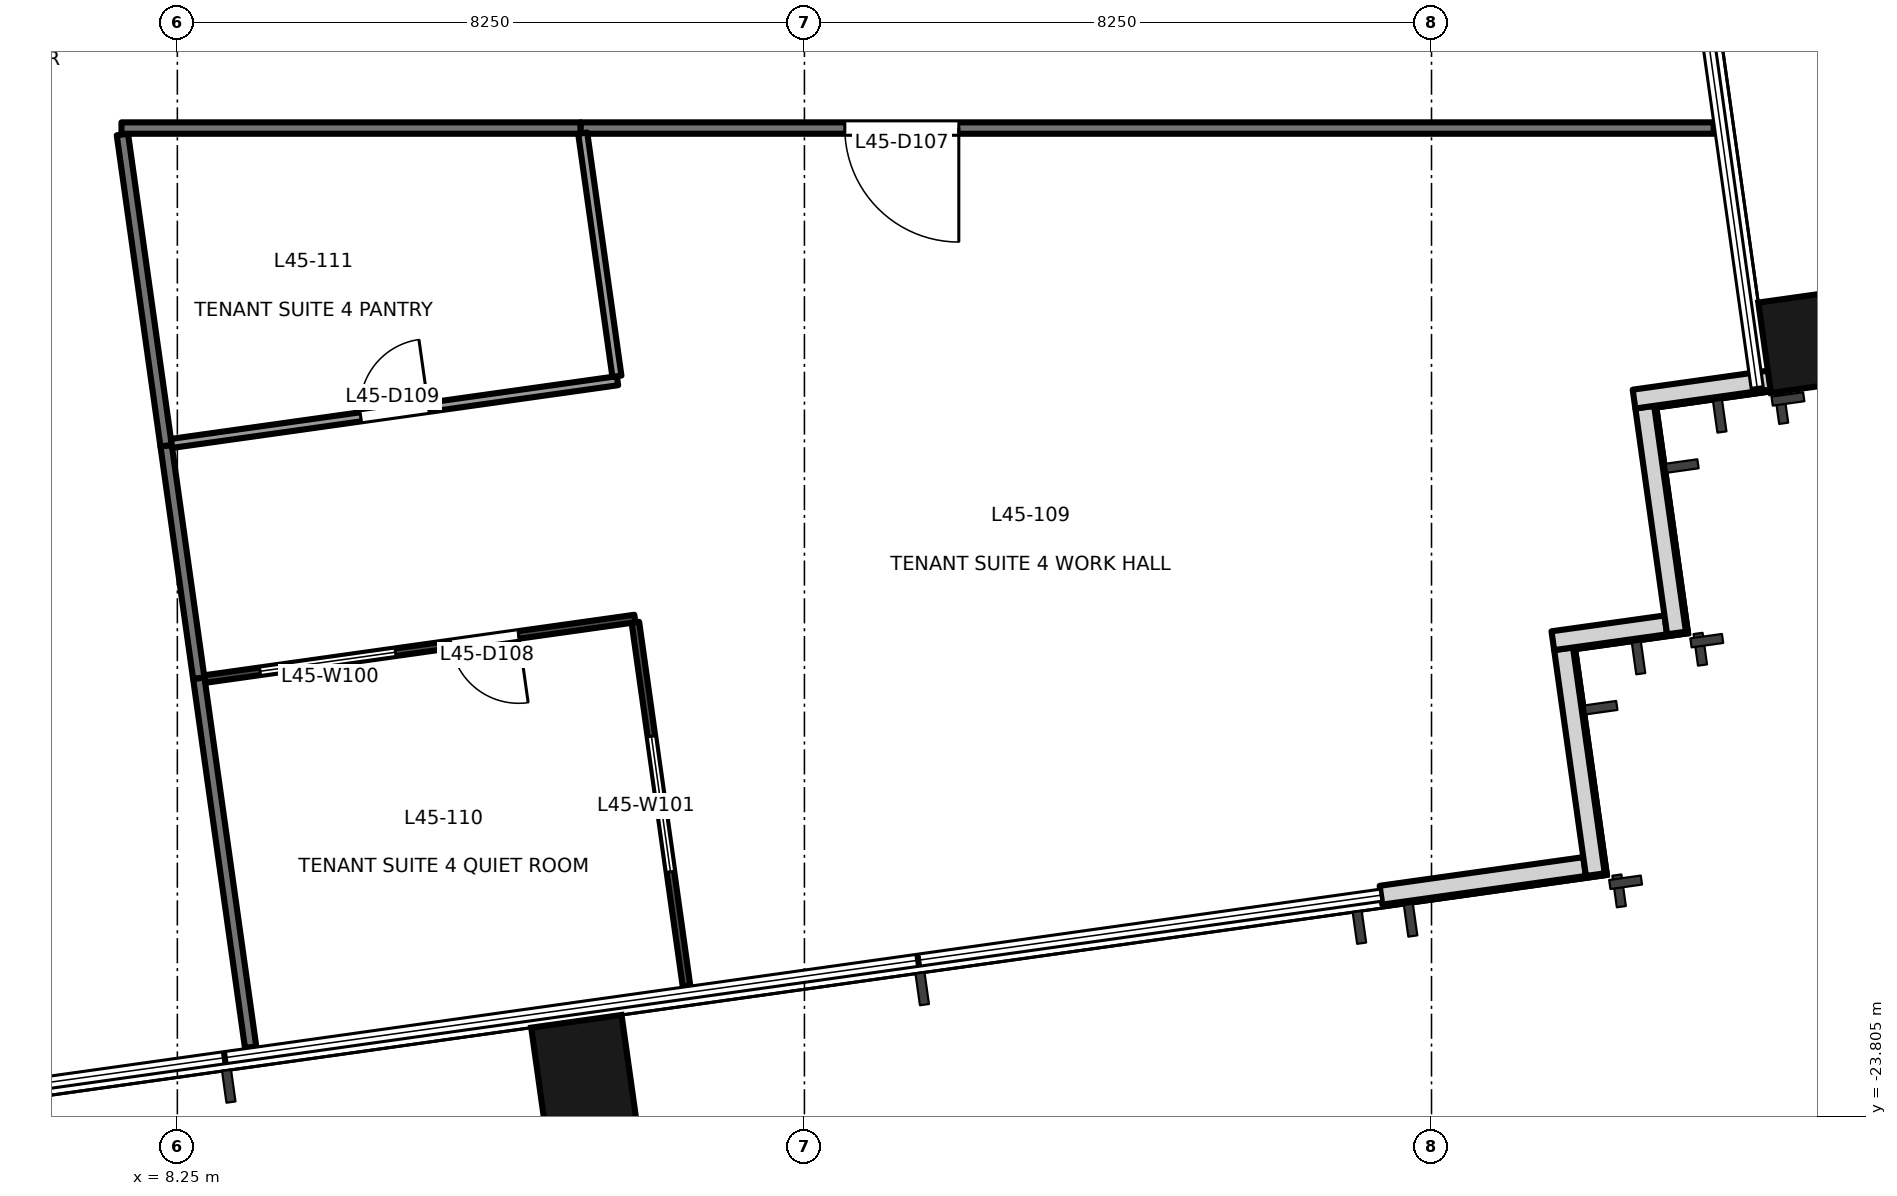
"""IFC4 building model, lengths in metres.
Left out: names, types, materials, properties, quantities, classifications, styles, units other than length and angle.
Written with IfcOpenShell. Run it as: python <this file> out.ifc"""

import sys

from ifc_helpers import new_model, si_unit, direction, frame, frame_2d, origin, origin_2d, place, context, subcontext, project, spatial, rectangle, extrude, element, fill, save


model = new_model("IFC4")
c1 = context("Model", 3, precision=1e-05, world=origin(), true_north=direction((0.0, 1.0)))
c2 = subcontext(c1, "Body", "Model", "MODEL_VIEW")
j1 = project(units=[si_unit("LENGTHUNIT", "METRE"), si_unit("PLANEANGLEUNIT", "RADIAN")], contexts=[c1])
p1 = place(None, origin())
s1 = spatial("IfcSite", under=j1, at=p1, CompositionType="ELEMENT")
p2 = place(p1, origin())
s2 = spatial("IfcBuilding", under=s1, at=p2, CompositionType="ELEMENT")
p3 = place(p2, frame((0.0, 0.0, 195.8)))
s3 = spatial("IfcBuildingStorey", under=s2, at=p3, CompositionType="ELEMENT", Elevation=195.8)
for number, where, z_axis, x_axis in (
    (1, (13.625, -23.443, -0.2), (0.0, 0.0, 1.0), (0.99, 0.139, 0.0)),
    (2, (30.024, -13.565, -0.2), (0.0, 0.0, 1.0), (-0.139, 0.99, 0.0)),
):
    element("IfcColumn", number, at=place(p3, frame(where, z_axis=z_axis, x_axis=x_axis)), inside=s3, PredefinedType="COLUMN", context=c2, shape_type="SweptSolid", body=[
        extrude(rectangle(XDim=1.2, YDim=1.8, at=origin_2d()), origin(), (0.0, 0.0, 1.0), 3.9),
    ])
p4 = place(p3, frame((24.085, -20.893, 0.0), z_axis=(0.0, 0.0, 1.0), x_axis=(0.990255800966, 0.139260362823, 0.0)))
e3 = element("IfcWall", 3, at=p4, inside=s3, PredefinedType="SOLIDWALL", context=c2, shape_type="SweptSolid", body=[
    extrude(rectangle(XDim=2.705, YDim=0.25, at=frame_2d((1.353, 0.0))), origin(), (0.0, 0.0, 1.0), 3.7),
])
p5 = place(p3, frame((26.905, -20.622, 0.0), z_axis=(0.0, 0.0, 1.0), x_axis=(-0.139313431826, 0.990248336385, 0.0)))
e4 = element("IfcWall", 4, at=p5, inside=s3, PredefinedType="SOLIDWALL", context=c2, shape_type="SweptSolid", body=[
    extrude(rectangle(XDim=3.0, YDim=0.25, at=frame_2d((1.5, 0.0))), origin(), (0.0, 0.0, 1.0), 3.7),
])
p6 = place(p3, frame((26.346, -17.544, 0.0), z_axis=(0.0, 0.0, 1.0), x_axis=(0.990368090482, 0.13845954411, 0.0)))
e5 = element("IfcWall", 5, at=p6, inside=s3, PredefinedType="SOLIDWALL", context=c2, shape_type="SweptSolid", body=[
    extrude(rectangle(XDim=1.5, YDim=0.25, at=frame_2d((0.75, 0.0))), origin(), (0.0, 0.0, 1.0), 3.7),
])
p7 = place(p3, frame((27.973, -17.443, 0.0), z_axis=(0.0, 0.0, 1.0), x_axis=(-0.139313431826, 0.990248336385, 0.0)))
e6 = element("IfcWall", 6, at=p7, inside=s3, PredefinedType="SOLIDWALL", context=c2, shape_type="SweptSolid", body=[
    extrude(rectangle(XDim=3.0, YDim=0.25, at=frame_2d((1.5, 0.0))), origin(), (0.0, 0.0, 1.0), 3.7),
])
p8 = place(p3, frame((27.414, -14.366, 0.0), z_axis=(0.0, 0.0, 1.0), x_axis=(0.990256286673, 0.139256908998, 0.0)))
e7 = element("IfcWall", 7, at=p8, inside=s3, PredefinedType="SOLIDWALL", context=c2, shape_type="SweptSolid", body=[
    extrude(rectangle(XDim=1.801, YDim=0.25, at=frame_2d((0.9, 0.0))), origin(), (0.0, 0.0, 1.0), 3.7),
])
p9 = place(p3, frame((8.102, -14.979, 0.0), z_axis=(0.0, 0.0, 1.0), x_axis=(0.139131354665, -0.990273934903, 0.0)))
e8 = element("IfcWall", 8, at=p9, inside=s3, PredefinedType="PARTITIONING", context=c2, shape_type="SweptSolid", body=[
    extrude(rectangle(XDim=3.09, YDim=0.15, at=frame_2d((1.545, 0.0))), origin(), (0.0, 0.0, 1.0), 3.7),
])
p10 = place(p3, frame((28.463, -10.8, 0.0), z_axis=(0.0, 0.0, 1.0), x_axis=(-1.0, 0.0, 0.0)))
e9 = element("IfcWall", 9, at=p10, inside=s3, PredefinedType="PARTITIONING", context=c2, shape_type="SweptSolid", body=[
    extrude(rectangle(XDim=14.909, YDim=0.15, at=frame_2d((7.455, 0.0))), origin(), (0.0, 0.0, 1.0), 3.1),
])
p11 = place(p10, frame((9.932, 0.0, 0.0)))
e10 = element("IfcOpeningElement", 10, at=p11, cuts=e9, PredefinedType="OPENING", context=c2, shape_type="SweptSolid", body=[
    extrude(rectangle(XDim=1.5, YDim=2.1, at=frame_2d((0.75, 1.05))), frame((0.0, 0.085, 0.0), z_axis=(0.0, -1.0, 0.0), x_axis=(1.0, 0.0, 0.0)), (0.0, 0.0, 1.0), 0.171),
])
p12 = place(p3, frame((8.532, -18.039, 0.0), z_axis=(0.0, 0.0, 1.0), x_axis=(0.139189187394, -0.990265807808, 0.0)))
e11 = element("IfcWall", 11, at=p12, inside=s3, PredefinedType="PARTITIONING", context=c2, shape_type="SweptSolid", body=[
    extrude(rectangle(XDim=4.901, YDim=0.15, at=frame_2d((2.45, 0.0))), origin(), (0.0, 0.0, 1.0), 3.0),
])
p13 = place(p3, frame((7.527, -10.885, 0.0), z_axis=(0.0, 0.0, 1.0), x_axis=(0.1390729581, -0.990282137739, 0.0)))
e12 = element("IfcWall", 12, at=p13, inside=s3, PredefinedType="PARTITIONING", context=c2, shape_type="SweptSolid", body=[
    extrude(rectangle(XDim=4.134, YDim=0.15, at=frame_2d((2.067, 0.0))), origin(), (0.0, 0.0, 1.0), 3.7),
])
p14 = place(p3, frame((13.554, -10.8, 0.0), z_axis=(0.0, 0.0, 1.0), x_axis=(-1.0, 0.0, 0.0)))
e13 = element("IfcWall", 13, at=p14, inside=s3, PredefinedType="PARTITIONING", context=c2, shape_type="SweptSolid", body=[
    extrude(rectangle(XDim=6.039, YDim=0.15, at=frame_2d((3.02, 0.0))), origin(), (0.0, 0.0, 1.0), 3.0),
])
p15 = place(p3, frame((14.269, -17.253, 0.0), z_axis=(0.0, 0.0, 1.0), x_axis=(-0.990248016247, -0.139315707364, 0.0)))
e14 = element("IfcWall", 14, at=p15, inside=s3, PredefinedType="PARTITIONING", context=c2, shape_type="SweptSolid", body=[
    extrude(rectangle(XDim=5.715, YDim=0.1, at=frame_2d((2.857, 0.0))), origin(), (0.0, 0.0, 1.0), 3.0),
])
p16 = place(p15, frame((1.544, 0.0, 0.0)))
e15 = element("IfcOpeningElement", 15, at=p16, cuts=e14, PredefinedType="OPENING", context=c2, shape_type="SweptSolid", body=[
    extrude(rectangle(XDim=0.9, YDim=2.1, at=frame_2d((0.45, 1.05))), frame((0.0, 0.061, 0.0), z_axis=(0.0, -1.0, 0.0), x_axis=(1.0, 0.0, 0.0)), (0.0, 0.0, 1.0), 0.121),
])
p17 = place(p15, frame((3.18, 0.0, 0.9)))
e16 = element("IfcOpeningElement", 16, at=p17, cuts=e14, PredefinedType="OPENING", context=c2, shape_type="SweptSolid", body=[
    extrude(rectangle(XDim=1.8, YDim=1.2, at=frame_2d((0.9, 0.6))), frame((0.0, 0.061, 0.0), z_axis=(0.0, -1.0, 0.0), x_axis=(1.0, 0.0, 0.0)), (0.0, 0.0, 1.0), 0.121),
])
p18 = place(p3, frame((14.948, -22.085, 0.0), z_axis=(0.0, 0.0, 1.0), x_axis=(-0.139184338849, 0.990266489294, 0.0)))
e17 = element("IfcWall", 17, at=p18, inside=s3, PredefinedType="PARTITIONING", context=c2, shape_type="SweptSolid", body=[
    extrude(rectangle(XDim=4.829, YDim=0.1, at=frame_2d((2.415, 0.0))), origin(), (0.0, 0.0, 1.0), 3.7),
])
p19 = place(p18, frame((1.515, 0.0, 0.9)))
e18 = element("IfcOpeningElement", 18, at=p19, cuts=e17, PredefinedType="OPENING", context=c2, shape_type="SweptSolid", body=[
    extrude(rectangle(XDim=1.8, YDim=1.2, at=frame_2d((0.9, 0.6))), frame((0.0, 0.061, 0.0), z_axis=(0.0, -1.0, 0.0), x_axis=(1.0, 0.0, 0.0)), (0.0, 0.0, 1.0), 0.121),
])
p20 = place(p3, frame((8.174, -14.949, 0.0), z_axis=(0.0, 0.0, 1.0), x_axis=(0.990258620858, 0.139240309595, 0.0)))
e19 = element("IfcWall", 19, at=p20, inside=s3, PredefinedType="PARTITIONING", context=c2, shape_type="SweptSolid", body=[
    extrude(rectangle(XDim=5.925, YDim=0.12, at=frame_2d((2.962, 0.0))), origin(), (0.0, 0.0, 1.0), 3.0),
])
p21 = place(p20, frame((2.513, 0.0, 0.0)))
e20 = element("IfcOpeningElement", 20, at=p21, cuts=e19, PredefinedType="OPENING", context=c2, shape_type="SweptSolid", body=[
    extrude(rectangle(XDim=0.9, YDim=2.1, at=frame_2d((0.45, 1.05))), frame((0.0, 0.071, 0.0), z_axis=(0.0, -1.0, 0.0), x_axis=(1.0, 0.0, 0.0)), (0.0, 0.0, 1.0), 0.141),
])
p22 = place(p3, frame((14.033, -14.065, 0.0), z_axis=(0.0, 0.0, 1.0), x_axis=(-0.139325487292, 0.990246640283, 0.0)))
e21 = element("IfcWall", 21, at=p22, inside=s3, PredefinedType="PARTITIONING", context=c2, shape_type="SweptSolid", body=[
    extrude(rectangle(XDim=3.229, YDim=0.12, at=frame_2d((1.615, 0.0))), origin(), (0.0, 0.0, 1.0), 3.1),
])
p23 = place(p11, origin())
e22 = element("IfcDoor", 22, at=p23, inside=s3, OperationType="DOUBLE_DOOR_SINGLE_SWING", PredefinedType="DOOR", context=c2, shape_type="SweptSolid", body=[
    extrude(rectangle(XDim=1.5, YDim=2.1, at=frame_2d((0.75, 1.05))), frame((0.0, 0.025, 0.0), z_axis=(0.0, -1.0, 0.0), x_axis=(1.0, 0.0, 0.0)), (0.0, 0.0, 1.0), 0.05),
])
fill(e10, e22)
p24 = place(p16, origin())
e23 = element("IfcDoor", 23, at=p24, inside=s3, OperationType="SINGLE_SWING_LEFT", PredefinedType="DOOR", context=c2, shape_type="SweptSolid", body=[
    extrude(rectangle(XDim=0.9, YDim=2.1, at=frame_2d((0.45, 1.05))), frame((0.0, 0.025, 0.0), z_axis=(0.0, -1.0, 0.0), x_axis=(1.0, 0.0, 0.0)), (0.0, 0.0, 1.0), 0.05),
])
fill(e15, e23)
p25 = place(p21, origin())
e24 = element("IfcDoor", 24, at=p25, inside=s3, OperationType="SINGLE_SWING_RIGHT", PredefinedType="DOOR", context=c2, shape_type="SweptSolid", body=[
    extrude(rectangle(XDim=0.9, YDim=2.1, at=frame_2d((0.45, 1.05))), frame((0.0, 0.025, 0.0), z_axis=(0.0, -1.0, 0.0), x_axis=(1.0, 0.0, 0.0)), (0.0, 0.0, 1.0), 0.05),
])
fill(e20, e24)
p26 = place(p17, origin())
e25 = element("IfcWindow", 25, at=p26, inside=s3, PartitioningType="SINGLE_PANEL", PredefinedType="WINDOW", context=c2, shape_type="SweptSolid", body=[
    extrude(rectangle(XDim=1.8, YDim=1.2, at=frame_2d((0.9, 0.6))), frame((0.0, 0.03, 0.0), z_axis=(0.0, -1.0, 0.0), x_axis=(1.0, 0.0, 0.0)), (0.0, 0.0, 1.0), 0.06),
])
fill(e16, e25)
p27 = place(p19, origin())
e26 = element("IfcWindow", 26, at=p27, inside=s3, PartitioningType="SINGLE_PANEL", PredefinedType="WINDOW", context=c2, shape_type="SweptSolid", body=[
    extrude(rectangle(XDim=1.8, YDim=1.2, at=frame_2d((0.9, 0.6))), frame((0.0, 0.03, 0.0), z_axis=(0.0, -1.0, 0.0), x_axis=(1.0, 0.0, 0.0)), (0.0, 0.0, 1.0), 0.06),
])
fill(e18, e26)
save(model, sys.argv[1])
